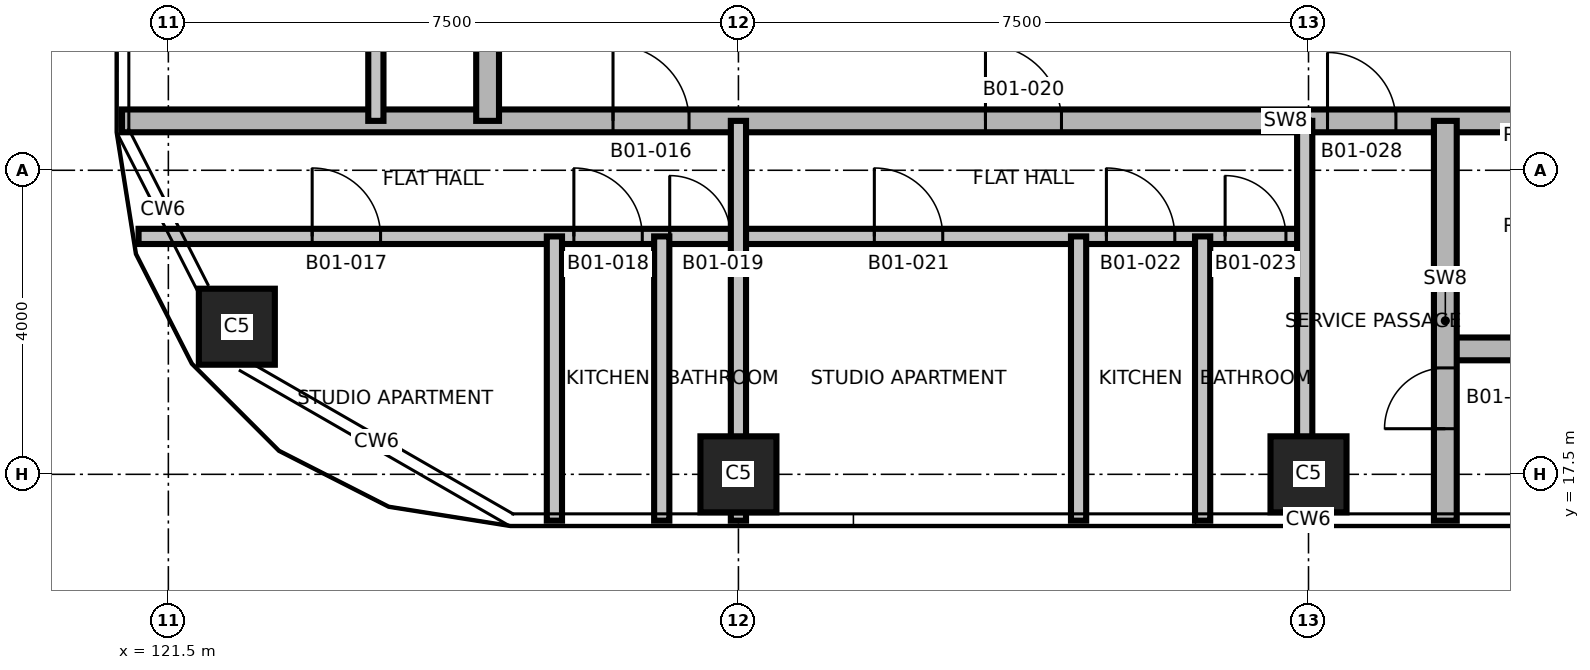
"""IFC4 building model, lengths in metres.
Left out: names, types, materials, properties, quantities, classifications, styles, units other than length and angle.
Written with IfcOpenShell. Run it as: python <this file> out.ifc"""

import sys

from ifc_helpers import new_model, si_unit, direction, frame, frame_2d, origin, origin_2d, place, context, subcontext, project, spatial, rectangle, extrude, element, fill, save


model = new_model("IFC4")
c1 = context("Model", 3, precision=1e-05, world=origin(), true_north=direction((0.0, 1.0)))
c2 = subcontext(c1, "Body", "Model", "MODEL_VIEW")
j1 = project(units=[si_unit("LENGTHUNIT", "METRE"), si_unit("PLANEANGLEUNIT", "RADIAN")], contexts=[c1])
p1 = place(None, origin())
s1 = spatial("IfcSite", under=j1, at=p1, CompositionType="ELEMENT")
p2 = place(p1, origin())
s2 = spatial("IfcBuilding", under=s1, at=p2, CompositionType="ELEMENT")
p3 = place(p2, frame((0.0, 0.0, 33.5)))
s3 = spatial("IfcBuildingStorey", under=s2, at=p3, CompositionType="ELEMENT", Elevation=33.5)
for number, where, z_axis, x_axis in (
    (1, (129.0, 17.5, 0.0), (0.0, 0.0, 1.0), (1.0, 0.0, 0.0)),
    (2, (136.5, 17.5, 0.0), (0.0, 0.0, 1.0), (1.0, 0.0, 0.0)),
    (3, (122.401, 19.442, 0.0), (0.0, 0.0, 1.0), (1.0, 0.0, 0.0)),
):
    element("IfcColumn", number, at=place(p3, frame(where, z_axis=z_axis, x_axis=x_axis)), inside=s3, PredefinedType="COLUMN", context=c2, shape_type="SweptSolid", body=[
        extrude(rectangle(XDim=1.0, YDim=1.0, at=origin_2d()), origin(), (0.0, 0.0, 1.0), 3.7),
    ])
p4 = place(p3, frame((138.25, 19.15, 0.0), z_axis=(0.0, 0.0, 1.0), x_axis=(1.0, 0.0, 0.0)))
e4 = element("IfcWall", 4, at=p4, inside=s3, PredefinedType="SHEAR", context=c2, shape_type="SweptSolid", body=[
    extrude(rectangle(XDim=5.75, YDim=0.3, at=frame_2d((2.875, 0.0))), origin(), (0.0, 0.0, 1.0), 3.4),
])
p5 = place(p3, frame((121.108, 20.63, 0.0), z_axis=(0.0, 0.0, 1.0), x_axis=(1.0, 0.0, 0.0)))
e5 = element("IfcWall", 5, at=p5, inside=s3, PredefinedType="PARTITIONING", context=c2, shape_type="SweptSolid", body=[
    extrude(rectangle(XDim=15.392, YDim=0.2, at=frame_2d((7.696, 0.0))), origin(), (0.0, 0.0, 1.0), 3.4),
])
p6 = place(p5, frame((2.284, 0.0, 0.0)))
e6 = element("IfcOpeningElement", 6, at=p6, cuts=e5, PredefinedType="OPENING", context=c2, shape_type="SweptSolid", body=[
    extrude(rectangle(XDim=0.9, YDim=2.1, at=frame_2d((0.45, 1.05))), frame((0.0, 0.11, 0.0), z_axis=(0.0, -1.0, 0.0), x_axis=(1.0, 0.0, 0.0)), (0.0, 0.0, 1.0), 0.22),
])
p7 = place(p5, frame((5.727, 0.0, 0.0)))
e7 = element("IfcOpeningElement", 7, at=p7, cuts=e5, PredefinedType="OPENING", context=c2, shape_type="SweptSolid", body=[
    extrude(rectangle(XDim=0.9, YDim=2.1, at=frame_2d((0.45, 1.05))), frame((0.0, 0.11, 0.0), z_axis=(0.0, -1.0, 0.0), x_axis=(1.0, 0.0, 0.0)), (0.0, 0.0, 1.0), 0.22),
])
p8 = place(p5, frame((6.988, 0.0, 0.0)))
e8 = element("IfcOpeningElement", 8, at=p8, cuts=e5, PredefinedType="OPENING", context=c2, shape_type="SweptSolid", body=[
    extrude(rectangle(XDim=0.8, YDim=2.1, at=frame_2d((0.4, 1.05))), frame((0.0, 0.11, 0.0), z_axis=(0.0, -1.0, 0.0), x_axis=(1.0, 0.0, 0.0)), (0.0, 0.0, 1.0), 0.22),
])
p9 = place(p5, frame((9.68, 0.0, 0.0)))
e9 = element("IfcOpeningElement", 9, at=p9, cuts=e5, PredefinedType="OPENING", context=c2, shape_type="SweptSolid", body=[
    extrude(rectangle(XDim=0.9, YDim=2.1, at=frame_2d((0.45, 1.05))), frame((0.0, 0.11, 0.0), z_axis=(0.0, -1.0, 0.0), x_axis=(1.0, 0.0, 0.0)), (0.0, 0.0, 1.0), 0.22),
])
p10 = place(p5, frame((12.733, 0.0, 0.0)))
e10 = element("IfcOpeningElement", 10, at=p10, cuts=e5, PredefinedType="OPENING", context=c2, shape_type="SweptSolid", body=[
    extrude(rectangle(XDim=0.9, YDim=2.1, at=frame_2d((0.45, 1.05))), frame((0.0, 0.11, 0.0), z_axis=(0.0, -1.0, 0.0), x_axis=(1.0, 0.0, 0.0)), (0.0, 0.0, 1.0), 0.22),
])
p11 = place(p5, frame((14.295, 0.0, 0.0)))
e11 = element("IfcOpeningElement", 11, at=p11, cuts=e5, PredefinedType="OPENING", context=c2, shape_type="SweptSolid", body=[
    extrude(rectangle(XDim=0.8, YDim=2.1, at=frame_2d((0.4, 1.05))), frame((0.0, 0.11, 0.0), z_axis=(0.0, -1.0, 0.0), x_axis=(1.0, 0.0, 0.0)), (0.0, 0.0, 1.0), 0.22),
])
p12 = place(p3, frame((120.89, 22.15, 0.0), z_axis=(0.0, 0.0, 1.0), x_axis=(1.0, 0.0, 0.0)))
e12 = element("IfcWall", 12, at=p12, inside=s3, PredefinedType="SHEAR", context=c2, shape_type="SweptSolid", body=[
    extrude(rectangle(XDim=31.22, YDim=0.3, at=frame_2d((15.61, 0.0))), origin(), (0.0, 0.0, 1.0), 3.4),
])
p13 = place(p12, frame((21.86, 0.0, 0.0)))
e13 = element("IfcOpeningElement", 13, at=p13, cuts=e12, PredefinedType="OPENING", context=c2, shape_type="SweptSolid", body=[
    extrude(rectangle(XDim=1.0, YDim=2.1, at=frame_2d((0.5, 1.05))), frame((0.0, 0.16, 0.0), z_axis=(0.0, -1.0, 0.0), x_axis=(1.0, 0.0, 0.0)), (0.0, 0.0, 1.0), 0.32),
])
p14 = place(p12, frame((6.46, 0.0, 0.0)))
e14 = element("IfcOpeningElement", 14, at=p14, cuts=e12, PredefinedType="OPENING", context=c2, shape_type="SweptSolid", body=[
    extrude(rectangle(XDim=1.0, YDim=2.1, at=frame_2d((0.5, 1.05))), frame((0.0, 0.16, 0.0), z_axis=(0.0, -1.0, 0.0), x_axis=(1.0, 0.0, 0.0)), (0.0, 0.0, 1.0), 0.32),
])
p15 = place(p12, frame((11.36, 0.0, 0.0)))
e15 = element("IfcOpeningElement", 15, at=p15, cuts=e12, PredefinedType="OPENING", context=c2, shape_type="SweptSolid", body=[
    extrude(rectangle(XDim=1.0, YDim=2.1, at=frame_2d((0.5, 1.05))), frame((0.0, 0.16, 0.0), z_axis=(0.0, -1.0, 0.0), x_axis=(1.0, 0.0, 0.0)), (0.0, 0.0, 1.0), 0.32),
])
p16 = place(p12, frame((23.76, 0.0, 0.0)))
e16 = element("IfcOpeningElement", 16, at=p16, cuts=e12, PredefinedType="OPENING", context=c2, shape_type="SweptSolid", body=[
    extrude(rectangle(XDim=1.0, YDim=2.1, at=frame_2d((0.5, 1.05))), frame((0.0, 0.16, 0.0), z_axis=(0.0, -1.0, 0.0), x_axis=(1.0, 0.0, 0.0)), (0.0, 0.0, 1.0), 0.32),
])
p17 = place(p12, frame((15.86, 0.0, 0.0)))
e17 = element("IfcOpeningElement", 17, at=p17, cuts=e12, PredefinedType="OPENING", context=c2, shape_type="SweptSolid", body=[
    extrude(rectangle(XDim=0.9, YDim=2.1, at=frame_2d((0.45, 1.05))), frame((0.0, 0.16, 0.0), z_axis=(0.0, -1.0, 0.0), x_axis=(1.0, 0.0, 0.0)), (0.0, 0.0, 1.0), 0.32),
])
p18 = place(p3, frame((124.23, 22.15, 0.0), z_axis=(0.0, 0.0, 1.0), x_axis=(0.0, 1.0, 0.0)))
e18 = element("IfcWall", 18, at=p18, inside=s3, PredefinedType="PARTITIONING", context=c2, shape_type="SweptSolid", body=[
    extrude(rectangle(XDim=17.7, YDim=0.2, at=frame_2d((8.85, 0.0))), origin(), (0.0, 0.0, 1.0), 3.4),
])
p19 = place(p18, frame((1.028, 0.0, 0.0)))
e19 = element("IfcOpeningElement", 19, at=p19, cuts=e18, PredefinedType="OPENING", context=c2, shape_type="SweptSolid", body=[
    extrude(rectangle(XDim=0.9, YDim=2.1, at=frame_2d((0.45, 1.05))), frame((0.0, 0.11, 0.0), z_axis=(0.0, -1.0, 0.0), x_axis=(1.0, 0.0, 0.0)), (0.0, 0.0, 1.0), 0.22),
])
p20 = place(p18, frame((3.253, 0.0, 0.0)))
e20 = element("IfcOpeningElement", 20, at=p20, cuts=e18, PredefinedType="OPENING", context=c2, shape_type="SweptSolid", body=[
    extrude(rectangle(XDim=0.8, YDim=2.1, at=frame_2d((0.4, 1.05))), frame((0.0, 0.11, 0.0), z_axis=(0.0, -1.0, 0.0), x_axis=(1.0, 0.0, 0.0)), (0.0, 0.0, 1.0), 0.22),
])
p21 = place(p18, frame((6.867, 0.0, 0.0)))
e21 = element("IfcOpeningElement", 21, at=p21, cuts=e18, PredefinedType="OPENING", context=c2, shape_type="SweptSolid", body=[
    extrude(rectangle(XDim=0.9, YDim=2.1, at=frame_2d((0.45, 1.05))), frame((0.0, 0.11, 0.0), z_axis=(0.0, -1.0, 0.0), x_axis=(1.0, 0.0, 0.0)), (0.0, 0.0, 1.0), 0.22),
])
p22 = place(p18, frame((11.367, 0.0, 0.0)))
e22 = element("IfcOpeningElement", 22, at=p22, cuts=e18, PredefinedType="OPENING", context=c2, shape_type="SweptSolid", body=[
    extrude(rectangle(XDim=0.9, YDim=2.1, at=frame_2d((0.45, 1.05))), frame((0.0, 0.11, 0.0), z_axis=(0.0, -1.0, 0.0), x_axis=(1.0, 0.0, 0.0)), (0.0, 0.0, 1.0), 0.22),
])
p23 = place(p18, frame((15.075, 0.0, 0.0)))
e23 = element("IfcOpeningElement", 23, at=p23, cuts=e18, PredefinedType="OPENING", context=c2, shape_type="SweptSolid", body=[
    extrude(rectangle(XDim=0.9, YDim=2.1, at=frame_2d((0.45, 1.05))), frame((0.0, 0.11, 0.0), z_axis=(0.0, -1.0, 0.0), x_axis=(1.0, 0.0, 0.0)), (0.0, 0.0, 1.0), 0.22),
])
p24 = place(p3, frame((125.7, 22.15, 0.0), z_axis=(0.0, 0.0, 1.0), x_axis=(0.0, 1.0, 0.0)))
e24 = element("IfcWall", 24, at=p24, inside=s3, PredefinedType="SHEAR", context=c2, shape_type="SweptSolid", body=[
    extrude(rectangle(XDim=17.7, YDim=0.3, at=frame_2d((8.85, 0.0))), origin(), (0.0, 0.0, 1.0), 3.4),
])
p25 = place(p24, frame((2.7, 0.0, 0.0)))
e25 = element("IfcOpeningElement", 25, at=p25, cuts=e24, PredefinedType="OPENING", context=c2, shape_type="SweptSolid", body=[
    extrude(rectangle(XDim=1.0, YDim=2.1, at=frame_2d((0.5, 1.05))), frame((0.0, 0.16, 0.0), z_axis=(0.0, -1.0, 0.0), x_axis=(1.0, 0.0, 0.0)), (0.0, 0.0, 1.0), 0.32),
])
for number, where, z_axis, x_axis in (
    (26, (126.579, 16.89, 0.0), (0.0, 0.0, 1.0), (0.0, 1.0, 0.0)),
    (27, (127.991, 16.89, 0.0), (0.0, 0.0, 1.0), (0.0, 1.0, 0.0)),
):
    element("IfcWall", number, at=place(p3, frame(where, z_axis=z_axis, x_axis=x_axis)), inside=s3, PredefinedType="PARTITIONING", context=c2, shape_type="SweptSolid", body=[
        extrude(rectangle(XDim=3.74, YDim=0.2, at=frame_2d((1.87, 0.0))), origin(), (0.0, 0.0, 1.0), 3.4),
    ])
p26 = place(p3, frame((129.0, 16.89, 0.0), z_axis=(0.0, 0.0, 1.0), x_axis=(0.0, 1.0, 0.0)))
e28 = element("IfcWall", 28, at=p26, inside=s3, PredefinedType="PARTITIONING", context=c2, shape_type="SweptSolid", body=[
    extrude(rectangle(XDim=5.26, YDim=0.2, at=frame_2d((2.63, 0.0))), origin(), (0.0, 0.0, 1.0), 3.4),
])
for number, where, z_axis, x_axis in (
    (29, (133.475, 16.89, 0.0), (0.0, 0.0, 1.0), (0.0, 1.0, 0.0)),
    (30, (135.107, 16.89, 0.0), (0.0, 0.0, 1.0), (0.0, 1.0, 0.0)),
):
    element("IfcWall", number, at=place(p3, frame(where, z_axis=z_axis, x_axis=x_axis)), inside=s3, PredefinedType="PARTITIONING", context=c2, shape_type="SweptSolid", body=[
        extrude(rectangle(XDim=3.74, YDim=0.2, at=frame_2d((1.87, 0.0))), origin(), (0.0, 0.0, 1.0), 3.4),
    ])
p27 = place(p3, frame((136.45, 16.89, 0.0), z_axis=(0.0, 0.0, 1.0), x_axis=(0.0, 1.0, 0.0)))
e31 = element("IfcWall", 31, at=p27, inside=s3, PredefinedType="PARTITIONING", context=c2, shape_type="SweptSolid", body=[
    extrude(rectangle(XDim=5.26, YDim=0.2, at=frame_2d((2.63, 0.0))), origin(), (0.0, 0.0, 1.0), 3.4),
])
p28 = place(p3, frame((138.3, 16.89, 0.0), z_axis=(0.0, 0.0, 1.0), x_axis=(0.0, 1.0, 0.0)))
e32 = element("IfcWall", 32, at=p28, inside=s3, PredefinedType="SHEAR", context=c2, shape_type="SweptSolid", body=[
    extrude(rectangle(XDim=5.26, YDim=0.3, at=frame_2d((2.63, 0.0))), origin(), (0.0, 0.0, 1.0), 3.4),
])
p29 = place(p28, frame((1.21, 0.0, 0.0)))
e33 = element("IfcOpeningElement", 33, at=p29, cuts=e32, PredefinedType="OPENING", context=c2, shape_type="SweptSolid", body=[
    extrude(rectangle(XDim=0.8, YDim=2.1, at=frame_2d((0.4, 1.05))), frame((0.0, 0.16, 0.0), z_axis=(0.0, -1.0, 0.0), x_axis=(1.0, 0.0, 0.0)), (0.0, 0.0, 1.0), 0.32),
])
p30 = place(p14, origin())
e34 = element("IfcDoor", 34, at=p30, inside=s3, OperationType="SINGLE_SWING_RIGHT", PredefinedType="DOOR", context=c2, shape_type="SweptSolid", body=[
    extrude(rectangle(XDim=1.0, YDim=2.1, at=frame_2d((0.5, 1.05))), frame((0.0, 0.025, 0.0), z_axis=(0.0, -1.0, 0.0), x_axis=(1.0, 0.0, 0.0)), (0.0, 0.0, 1.0), 0.05),
])
fill(e14, e34)
p31 = place(p6, origin())
e35 = element("IfcDoor", 35, at=p31, inside=s3, OperationType="SINGLE_SWING_LEFT", PredefinedType="DOOR", context=c2, shape_type="SweptSolid", body=[
    extrude(rectangle(XDim=0.9, YDim=2.1, at=frame_2d((0.45, 1.05))), frame((0.0, 0.025, 0.0), z_axis=(0.0, -1.0, 0.0), x_axis=(1.0, 0.0, 0.0)), (0.0, 0.0, 1.0), 0.05),
])
fill(e6, e35)
p32 = place(p7, origin())
e36 = element("IfcDoor", 36, at=p32, inside=s3, OperationType="SINGLE_SWING_RIGHT", PredefinedType="DOOR", context=c2, shape_type="SweptSolid", body=[
    extrude(rectangle(XDim=0.9, YDim=2.1, at=frame_2d((0.45, 1.05))), frame((0.0, 0.025, 0.0), z_axis=(0.0, -1.0, 0.0), x_axis=(1.0, 0.0, 0.0)), (0.0, 0.0, 1.0), 0.05),
])
fill(e7, e36)
p33 = place(p8, origin())
e37 = element("IfcDoor", 37, at=p33, inside=s3, OperationType="SINGLE_SWING_LEFT", PredefinedType="DOOR", context=c2, shape_type="SweptSolid", body=[
    extrude(rectangle(XDim=0.8, YDim=2.1, at=frame_2d((0.4, 1.05))), frame((0.0, 0.025, 0.0), z_axis=(0.0, -1.0, 0.0), x_axis=(1.0, 0.0, 0.0)), (0.0, 0.0, 1.0), 0.05),
])
fill(e8, e37)
p34 = place(p15, origin())
e38 = element("IfcDoor", 38, at=p34, inside=s3, OperationType="SINGLE_SWING_RIGHT", PredefinedType="DOOR", context=c2, shape_type="SweptSolid", body=[
    extrude(rectangle(XDim=1.0, YDim=2.1, at=frame_2d((0.5, 1.05))), frame((0.0, 0.025, 0.0), z_axis=(0.0, -1.0, 0.0), x_axis=(1.0, 0.0, 0.0)), (0.0, 0.0, 1.0), 0.05),
])
fill(e15, e38)
p35 = place(p9, origin())
e39 = element("IfcDoor", 39, at=p35, inside=s3, OperationType="SINGLE_SWING_LEFT", PredefinedType="DOOR", context=c2, shape_type="SweptSolid", body=[
    extrude(rectangle(XDim=0.9, YDim=2.1, at=frame_2d((0.45, 1.05))), frame((0.0, 0.025, 0.0), z_axis=(0.0, -1.0, 0.0), x_axis=(1.0, 0.0, 0.0)), (0.0, 0.0, 1.0), 0.05),
])
fill(e9, e39)
p36 = place(p10, origin())
e40 = element("IfcDoor", 40, at=p36, inside=s3, OperationType="SINGLE_SWING_RIGHT", PredefinedType="DOOR", context=c2, shape_type="SweptSolid", body=[
    extrude(rectangle(XDim=0.9, YDim=2.1, at=frame_2d((0.45, 1.05))), frame((0.0, 0.025, 0.0), z_axis=(0.0, -1.0, 0.0), x_axis=(1.0, 0.0, 0.0)), (0.0, 0.0, 1.0), 0.05),
])
fill(e10, e40)
p37 = place(p11, origin())
e41 = element("IfcDoor", 41, at=p37, inside=s3, OperationType="SINGLE_SWING_LEFT", PredefinedType="DOOR", context=c2, shape_type="SweptSolid", body=[
    extrude(rectangle(XDim=0.8, YDim=2.1, at=frame_2d((0.4, 1.05))), frame((0.0, 0.025, 0.0), z_axis=(0.0, -1.0, 0.0), x_axis=(1.0, 0.0, 0.0)), (0.0, 0.0, 1.0), 0.05),
])
fill(e11, e41)
p38 = place(p17, origin())
e42 = element("IfcDoor", 42, at=p38, inside=s3, OperationType="SINGLE_SWING_RIGHT", PredefinedType="DOOR", context=c2, shape_type="SweptSolid", body=[
    extrude(rectangle(XDim=0.9, YDim=2.1, at=frame_2d((0.45, 1.05))), frame((0.0, 0.025, 0.0), z_axis=(0.0, -1.0, 0.0), x_axis=(1.0, 0.0, 0.0)), (0.0, 0.0, 1.0), 0.05),
])
fill(e17, e42)
p39 = place(p29, origin())
e43 = element("IfcDoor", 43, at=p39, inside=s3, OperationType="SINGLE_SWING_LEFT", PredefinedType="DOOR", context=c2, shape_type="SweptSolid", body=[
    extrude(rectangle(XDim=0.8, YDim=2.1, at=frame_2d((0.4, 1.05))), frame((0.0, 0.025, 0.0), z_axis=(0.0, -1.0, 0.0), x_axis=(1.0, 0.0, 0.0)), (0.0, 0.0, 1.0), 0.05),
])
fill(e33, e43)
save(model, sys.argv[1])
